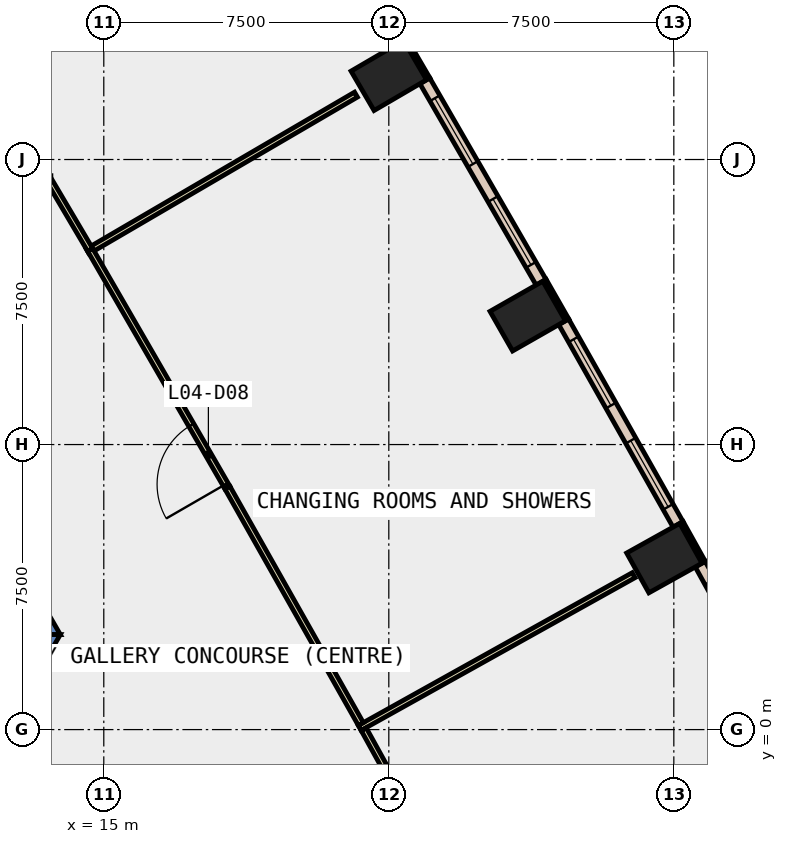
"""IFC4 building model, lengths in metres.
Left out: names, types, materials, properties, quantities, classifications, styles, units other than length and angle.
Written with IfcOpenShell. Run it as: python <this file> out.ifc"""

import sys

from ifc_helpers import new_model, si_unit, direction, frame, frame_2d, origin, origin_2d, place, context, subcontext, project, spatial, polyline, rectangle, outline, extrude, element, fill, save


model = new_model("IFC4")
c1 = context("Model", 3, precision=1e-05, world=origin(), true_north=direction((0.0, 1.0)))
c2 = subcontext(c1, "Body", "Model", "MODEL_VIEW")
j1 = project(units=[si_unit("LENGTHUNIT", "METRE"), si_unit("PLANEANGLEUNIT", "RADIAN")], contexts=[c1])
p1 = place(None, origin())
s1 = spatial("IfcSite", under=j1, at=p1, CompositionType="ELEMENT")
p2 = place(p1, origin())
s2 = spatial("IfcBuilding", under=s1, at=p2, CompositionType="ELEMENT")
p3 = place(p2, frame((0.0, 0.0, 25.0)))
s3 = spatial("IfcBuildingStorey", under=s2, at=p3, CompositionType="ELEMENT", Elevation=25.0)
for number, where, z_axis, x_axis in (
    (1, (29.75, 4.512, -0.45), (0.0, 0.0, 1.0), (-0.487, 0.873, 0.0)),
    (2, (26.155, 10.88, -0.45), (0.0, 0.0, 1.0), (-0.496, 0.869, 0.0)),
    (3, (22.5, 17.211, -0.45), (0.0, 0.0, 1.0), (-0.504, 0.864, 0.0)),
):
    element("IfcColumn", number, at=place(p3, frame(where, z_axis=z_axis, x_axis=x_axis)), inside=s3, PredefinedType="COLUMN", context=c2, shape_type="SweptSolid", body=[
        extrude(rectangle(XDim=1.2, YDim=1.6, at=origin_2d()), origin(), (0.0, 0.0, 1.0), 5.0),
    ])
p4 = place(p3, frame((0.0, 0.0, -0.45)))
e4 = element("IfcWall", 4, at=p4, inside=s3, PredefinedType="SHEAR", context=c2, shape_type="SweptSolid", body=[
    extrude(outline(polyline([(8.517, 11.748), (7.651, 11.248), (12.702, 2.5), (13.856, 2.5), (8.517, 11.748)])), origin(), (0.0, 0.0, 1.0), 5.0),
])
p5 = place(p3, frame((0.0, 0.0, -0.45)))
e5 = element("IfcWall", 5, at=p5, inside=s3, PredefinedType="SHEAR", context=c2, shape_type="SweptSolid", body=[
    extrude(outline(polyline([(11.801, 0.94), (12.667, 0.44), (13.856, 2.5), (12.702, 2.5), (11.801, 0.94)])), origin(), (0.0, 0.0, 1.0), 5.0),
])
p6 = place(p3, frame((30.784, 4.402, 0.0), z_axis=(0.0, 0.0, 1.0), x_axis=(-0.486817526853, 0.873503689488, 0.0)))
e6 = element("IfcWall", 6, at=p6, inside=s3, PredefinedType="STANDARD", context=c2, shape_type="SweptSolid", body=[
    extrude(rectangle(XDim=1.2, YDim=0.1, at=frame_2d((0.6, 0.0))), origin(), (0.0, 0.0, 1.0), 4.55),
])
p7 = place(p3, frame((27.191, 10.78, 0.0), z_axis=(0.0, 0.0, 1.0), x_axis=(-0.495854054996, 0.868405870629, 0.0)))
e7 = element("IfcWall", 7, at=p7, inside=s3, PredefinedType="STANDARD", context=c2, shape_type="SweptSolid", body=[
    extrude(rectangle(XDim=1.2, YDim=0.1, at=frame_2d((0.6, 0.0))), origin(), (0.0, 0.0, 1.0), 4.55),
])
p8 = place(p3, frame((23.536, 17.122, 0.0), z_axis=(0.0, 0.0, 1.0), x_axis=(-0.504313844903, 0.863520437418, 0.0)))
e8 = element("IfcWall", 8, at=p8, inside=s3, PredefinedType="STANDARD", context=c2, shape_type="SweptSolid", body=[
    extrude(rectangle(XDim=1.2, YDim=0.1, at=frame_2d((0.6, 0.0))), origin(), (0.0, 0.0, 1.0), 4.55),
])
p9 = place(p3, frame((33.652, -1.006, 0.0), z_axis=(0.0, 0.0, 1.0), x_axis=(-0.483233380559, 0.875491576152, 0.0)))
e9 = element("IfcWall", 9, at=p9, inside=s3, PredefinedType="STANDARD", context=c2, shape_type="SweptSolid", body=[
    extrude(rectangle(XDim=6.121, YDim=0.3, at=frame_2d((3.061, 0.0))), origin(), (0.0, 0.0, 1.0), 4.55),
])
p10 = place(p9, frame((0.53, 0.0, 1.0)))
e10 = element("IfcOpeningElement", 10, at=p10, cuts=e9, PredefinedType="OPENING", context=c2, shape_type="SweptSolid", body=[
    extrude(rectangle(XDim=2.0, YDim=3.2, at=frame_2d((1.0, 1.6))), frame((0.0, 0.16, 0.0), z_axis=(0.0, -1.0, 0.0), x_axis=(1.0, 0.0, 0.0)), (0.0, 0.0, 1.0), 0.32),
])
p11 = place(p9, frame((3.591, 0.0, 1.0)))
e11 = element("IfcOpeningElement", 11, at=p11, cuts=e9, PredefinedType="OPENING", context=c2, shape_type="SweptSolid", body=[
    extrude(rectangle(XDim=2.0, YDim=3.2, at=frame_2d((1.0, 1.6))), frame((0.0, 0.16, 0.0), z_axis=(0.0, -1.0, 0.0), x_axis=(1.0, 0.0, 0.0)), (0.0, 0.0, 1.0), 0.32),
])
p12 = place(p3, frame((30.111, 5.399, 0.0), z_axis=(0.0, 0.0, 1.0), x_axis=(-0.491661677717, 0.870786308267, 0.0)))
e12 = element("IfcWall", 12, at=p12, inside=s3, PredefinedType="STANDARD", context=c2, shape_type="SweptSolid", body=[
    extrude(rectangle(XDim=6.122, YDim=0.3, at=frame_2d((3.061, 0.0))), origin(), (0.0, 0.0, 1.0), 4.55),
])
p13 = place(p12, frame((0.531, 0.0, 1.0)))
e13 = element("IfcOpeningElement", 13, at=p13, cuts=e12, PredefinedType="OPENING", context=c2, shape_type="SweptSolid", body=[
    extrude(rectangle(XDim=2.0, YDim=3.2, at=frame_2d((1.0, 1.6))), frame((0.0, 0.16, 0.0), z_axis=(0.0, -1.0, 0.0), x_axis=(1.0, 0.0, 0.0)), (0.0, 0.0, 1.0), 0.32),
])
p14 = place(p12, frame((3.592, 0.0, 1.0)))
e14 = element("IfcOpeningElement", 14, at=p14, cuts=e12, PredefinedType="OPENING", context=c2, shape_type="SweptSolid", body=[
    extrude(rectangle(XDim=2.0, YDim=3.2, at=frame_2d((1.0, 1.6))), frame((0.0, 0.16, 0.0), z_axis=(0.0, -1.0, 0.0), x_axis=(1.0, 0.0, 0.0)), (0.0, 0.0, 1.0), 0.32),
])
p15 = place(p3, frame((26.507, 11.77, 0.0), z_axis=(0.0, 0.0, 1.0), x_axis=(-0.499939977436, 0.866060055055, 0.0)))
e15 = element("IfcWall", 15, at=p15, inside=s3, PredefinedType="STANDARD", context=c2, shape_type="SweptSolid", body=[
    extrude(rectangle(XDim=6.121, YDim=0.3, at=frame_2d((3.061, 0.0))), origin(), (0.0, 0.0, 1.0), 4.55),
])
p16 = place(p15, frame((0.53, 0.0, 1.0)))
e16 = element("IfcOpeningElement", 16, at=p16, cuts=e15, PredefinedType="OPENING", context=c2, shape_type="SweptSolid", body=[
    extrude(rectangle(XDim=2.0, YDim=3.2, at=frame_2d((1.0, 1.6))), frame((0.0, 0.16, 0.0), z_axis=(0.0, -1.0, 0.0), x_axis=(1.0, 0.0, 0.0)), (0.0, 0.0, 1.0), 0.32),
])
p17 = place(p15, frame((3.591, 0.0, 1.0)))
e17 = element("IfcOpeningElement", 17, at=p17, cuts=e15, PredefinedType="OPENING", context=c2, shape_type="SweptSolid", body=[
    extrude(rectangle(XDim=2.0, YDim=3.2, at=frame_2d((1.0, 1.6))), frame((0.0, 0.16, 0.0), z_axis=(0.0, -1.0, 0.0), x_axis=(1.0, 0.0, 0.0)), (0.0, 0.0, 1.0), 0.32),
])
p18 = place(p3, frame((21.735, 0.044, 0.0), z_axis=(0.0, 0.0, 1.0), x_axis=(0.873420749931, 0.48696631669, 0.0)))
e18 = element("IfcWall", 18, at=p18, inside=s3, PredefinedType="PARTITIONING", context=c2, shape_type="SweptSolid", body=[
    extrude(rectangle(XDim=8.251, YDim=0.15, at=frame_2d((4.125, 0.0))), origin(), (0.0, 0.0, 1.0), 4.55),
])
p19 = place(p3, frame((23.814, -3.565, 0.0), z_axis=(0.0, 0.0, 1.0), x_axis=(-0.483357057036, 0.875423300703, 0.0)))
e19 = element("IfcWall", 19, at=p19, inside=s3, PredefinedType="PARTITIONING", context=c2, shape_type="SweptSolid", body=[
    extrude(rectangle(XDim=4.084, YDim=0.15, at=frame_2d((2.042, 0.0))), origin(), (0.0, 0.0, 1.0), 4.55),
])
p20 = place(p3, frame((14.577, 12.584, 0.0), z_axis=(0.0, 0.0, 1.0), x_axis=(0.863499311522, 0.504350016358, 0.0)))
e20 = element("IfcWall", 20, at=p20, inside=s3, PredefinedType="PARTITIONING", context=c2, shape_type="SweptSolid", body=[
    extrude(rectangle(XDim=8.175, YDim=0.15, at=frame_2d((4.087, 0.0))), origin(), (0.0, 0.0, 1.0), 4.55),
])
p21 = place(p3, frame((21.764, 0.146, 0.0), z_axis=(0.0, 0.0, 1.0), x_axis=(-0.491550482328, 0.87084908183, 0.0)))
e21 = element("IfcWall", 21, at=p21, inside=s3, PredefinedType="PARTITIONING", context=c2, shape_type="SweptSolid", body=[
    extrude(rectangle(XDim=7.145, YDim=0.15, at=frame_2d((3.572, 0.0))), origin(), (0.0, 0.0, 1.0), 4.55),
])
p22 = place(p3, frame((18.252, 6.368, 0.0), z_axis=(0.0, 0.0, 1.0), x_axis=(-0.499899030103, 0.866083690934, 0.0)))
e22 = element("IfcWall", 22, at=p22, inside=s3, PredefinedType="PARTITIONING", context=c2, shape_type="SweptSolid", body=[
    extrude(rectangle(XDim=7.221, YDim=0.15, at=frame_2d((3.611, 0.0))), origin(), (0.0, 0.0, 1.0), 4.55),
])
p23 = place(p22, frame((0.1, 0.0, 0.0)))
e23 = element("IfcOpeningElement", 23, at=p23, cuts=e22, PredefinedType="OPENING", context=c2, shape_type="SweptSolid", body=[
    extrude(rectangle(XDim=1.8, YDim=2.1, at=frame_2d((0.9, 1.05))), frame((0.0, 0.085, 0.0), z_axis=(0.0, -1.0, 0.0), x_axis=(1.0, 0.0, 0.0)), (0.0, 0.0, 1.0), 0.17),
])
p24 = place(p3, frame((14.641, 12.623, 0.0), z_axis=(0.0, 0.0, 1.0), x_axis=(-0.508494775472, 0.861065074961, 0.0)))
e24 = element("IfcWall", 24, at=p24, inside=s3, PredefinedType="PARTITIONING", context=c2, shape_type="SweptSolid", body=[
    extrude(rectangle(XDim=2.104, YDim=0.15, at=frame_2d((1.052, 0.0))), origin(), (0.0, 0.0, 1.0), 4.55),
])
p25 = place(p13, origin())
e25 = element("IfcWindow", 25, at=p25, inside=s3, PartitioningType="SINGLE_PANEL", PredefinedType="WINDOW", context=c2, shape_type="SweptSolid", body=[
    extrude(rectangle(XDim=2.0, YDim=3.2, at=frame_2d((1.0, 1.6))), frame((0.0, 0.03, 0.0), z_axis=(0.0, -1.0, 0.0), x_axis=(1.0, 0.0, 0.0)), (0.0, 0.0, 1.0), 0.06),
])
fill(e13, e25)
p26 = place(p14, origin())
e26 = element("IfcWindow", 26, at=p26, inside=s3, PartitioningType="SINGLE_PANEL", PredefinedType="WINDOW", context=c2, shape_type="SweptSolid", body=[
    extrude(rectangle(XDim=2.0, YDim=3.2, at=frame_2d((1.0, 1.6))), frame((0.0, 0.03, 0.0), z_axis=(0.0, -1.0, 0.0), x_axis=(1.0, 0.0, 0.0)), (0.0, 0.0, 1.0), 0.06),
])
fill(e14, e26)
p27 = place(p16, origin())
e27 = element("IfcWindow", 27, at=p27, inside=s3, PartitioningType="SINGLE_PANEL", PredefinedType="WINDOW", context=c2, shape_type="SweptSolid", body=[
    extrude(rectangle(XDim=2.0, YDim=3.2, at=frame_2d((1.0, 1.6))), frame((0.0, 0.03, 0.0), z_axis=(0.0, -1.0, 0.0), x_axis=(1.0, 0.0, 0.0)), (0.0, 0.0, 1.0), 0.06),
])
fill(e16, e27)
p28 = place(p17, origin())
e28 = element("IfcWindow", 28, at=p28, inside=s3, PartitioningType="SINGLE_PANEL", PredefinedType="WINDOW", context=c2, shape_type="SweptSolid", body=[
    extrude(rectangle(XDim=2.0, YDim=3.2, at=frame_2d((1.0, 1.6))), frame((0.0, 0.03, 0.0), z_axis=(0.0, -1.0, 0.0), x_axis=(1.0, 0.0, 0.0)), (0.0, 0.0, 1.0), 0.06),
])
fill(e17, e28)
p29 = place(p23, origin())
e29 = element("IfcDoor", 29, at=p29, inside=s3, OperationType="DOUBLE_DOOR_SINGLE_SWING", PredefinedType="DOOR", context=c2, shape_type="SweptSolid", body=[
    extrude(rectangle(XDim=1.8, YDim=2.1, at=frame_2d((0.9, 1.05))), frame((0.0, 0.025, 0.0), z_axis=(0.0, -1.0, 0.0), x_axis=(1.0, 0.0, 0.0)), (0.0, 0.0, 1.0), 0.05),
])
fill(e23, e29)
save(model, sys.argv[1])
